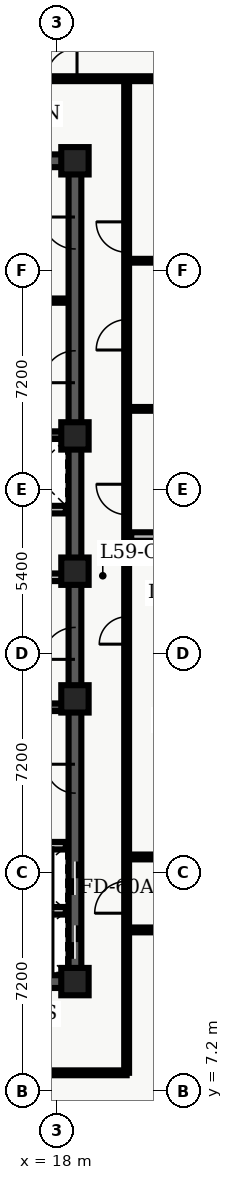
"""IFC4 building model, lengths in metres.
Left out: names, types, materials, properties, quantities, classifications, styles, units other than length and angle.
Written with IfcOpenShell. Run it as: python <this file> out.ifc"""

import sys

from ifc_helpers import new_model, entity, si_unit, converted_unit, direction, frame, origin_with_axes, origin_2d_with_axis, place, context, subcontext, project, spatial, polyline, rectangle, outline, extrude, element, fill, save


model = new_model("IFC4")
c1 = context("Model", 3, precision=1e-05, world=origin_with_axes(), true_north=direction((0.0, 1.0)))
c2 = subcontext(c1, "Body", "Model", "MODEL_VIEW")
j1 = project(units=[si_unit("LENGTHUNIT", "METRE"), converted_unit("PLANEANGLEUNIT", "DEGREE", entity("IfcPlaneAngleMeasure", 0.017), si_unit("PLANEANGLEUNIT", "RADIAN"), dimensions=[0, 0, 0, 0, 0, 0, 0])], contexts=[c1])
p1 = place(None, origin_with_axes())
s1 = spatial("IfcSite", under=j1, at=p1, CompositionType="ELEMENT")
p2 = place(p1, origin_with_axes())
s2 = spatial("IfcBuilding", under=s1, at=p2, CompositionType="ELEMENT")
p3 = place(p2, frame((0.0, 0.0, 240.3), z_axis=(0.0, 0.0, 1.0), x_axis=(1.0, 0.0, 0.0)))
s3 = spatial("IfcBuildingStorey", under=s2, at=p3, CompositionType="ELEMENT", Elevation=240.3)
p4 = place(p3, frame((11.4, 10.8, 0.0), z_axis=(0.0, 0.0, 1.0), x_axis=(1.0, 0.0, 0.0)))
e1 = element("IfcWall", 1, at=p4, inside=s3, PredefinedType="SHEAR", context=c2, shape_type="SweptSolid", body=[
    extrude(outline(polyline([(0.0, -0.21), (7.2, -0.21), (7.2, 0.21), (0.0, 0.21), (0.0, -0.21)])), origin_with_axes(), (0.0, 0.0, 1.0), 3.66),
])
p5 = place(p4, frame((2.625, 0.0, 0.0), z_axis=(0.0, 0.0, 1.0), x_axis=(1.0, 0.0, 0.0)))
e2 = element("IfcOpeningElement", 2, at=p5, cuts=e1, PredefinedType="OPENING", context=c2, shape_type="SweptSolid", body=[
    extrude(rectangle(XDim=1.05, YDim=0.44, at=origin_2d_with_axis()), origin_with_axes(), (0.0, 0.0, 1.0), 2.15),
])
p6 = place(p3, frame((11.4, 37.8, 0.0), z_axis=(0.0, 0.0, 1.0), x_axis=(1.0, 0.0, 0.0)))
e3 = element("IfcWall", 3, at=p6, inside=s3, PredefinedType="SHEAR", context=c2, shape_type="SweptSolid", body=[
    extrude(outline(polyline([(0.0, -0.21), (7.2, -0.21), (7.2, 0.21), (0.0, 0.21), (0.0, -0.21)])), origin_with_axes(), (0.0, 0.0, 1.0), 3.66),
])
p7 = place(p6, frame((2.625, 0.0, 0.0), z_axis=(0.0, 0.0, 1.0), x_axis=(1.0, 0.0, 0.0)))
e4 = element("IfcOpeningElement", 4, at=p7, cuts=e3, PredefinedType="OPENING", context=c2, shape_type="SweptSolid", body=[
    extrude(rectangle(XDim=1.05, YDim=0.44, at=origin_2d_with_axis()), origin_with_axes(), (0.0, 0.0, 1.0), 2.15),
])
p8 = place(p3, frame((18.6, 10.8, 0.0), z_axis=(0.0, 0.0, 1.0), x_axis=(0.0, 1.0, 0.0)))
e5 = element("IfcWall", 5, at=p8, inside=s3, PredefinedType="SHEAR", context=c2, shape_type="SweptSolid", body=[
    extrude(outline(polyline([(0.0, -0.21), (13.5, -0.21), (13.5, 0.21), (0.0, 0.21), (0.0, -0.21)])), origin_with_axes(), (0.0, 0.0, 1.0), 3.66),
])
p9 = place(p8, frame((1.3, 0.0, 0.0), z_axis=(0.0, 0.0, 1.0), x_axis=(1.0, 0.0, 0.0)))
e6 = element("IfcOpeningElement", 6, at=p9, cuts=e5, PredefinedType="OPENING", context=c2, shape_type="SweptSolid", body=[
    extrude(rectangle(XDim=1.1, YDim=0.44, at=origin_2d_with_axis()), origin_with_axes(), (0.0, 0.0, 1.0), 2.15),
])
p10 = place(p8, frame((3.4, 0.0, 0.0), z_axis=(0.0, 0.0, 1.0), x_axis=(1.0, 0.0, 0.0)))
e7 = element("IfcOpeningElement", 7, at=p10, cuts=e5, PredefinedType="OPENING", context=c2, shape_type="SweptSolid", body=[
    extrude(rectangle(XDim=1.1, YDim=0.44, at=origin_2d_with_axis()), origin_with_axes(), (0.0, 0.0, 1.0), 2.15),
])
p11 = place(p8, frame((11.125, 0.0, 0.0), z_axis=(0.0, 0.0, 1.0), x_axis=(1.0, 0.0, 0.0)))
e8 = element("IfcOpeningElement", 8, at=p11, cuts=e5, PredefinedType="OPENING", context=c2, shape_type="SweptSolid", body=[
    extrude(rectangle(XDim=1.05, YDim=0.44, at=origin_2d_with_axis()), origin_with_axes(), (0.0, 0.0, 1.0), 2.15),
])
p12 = place(p8, frame((6.675, 0.0, 0.0), z_axis=(0.0, 0.0, 1.0), x_axis=(1.0, 0.0, 0.0)))
e9 = element("IfcOpeningElement", 9, at=p12, cuts=e5, PredefinedType="OPENING", context=c2, shape_type="SweptSolid", body=[
    extrude(rectangle(XDim=0.95, YDim=0.44, at=origin_2d_with_axis()), origin_with_axes(), (0.0, 0.0, 1.0), 2.15),
])
p13 = place(p3, frame((18.6, 24.3, 0.0), z_axis=(0.0, 0.0, 1.0), x_axis=(0.0, 1.0, 0.0)))
e10 = element("IfcWall", 10, at=p13, inside=s3, PredefinedType="SHEAR", context=c2, shape_type="SweptSolid", body=[
    extrude(outline(polyline([(0.0, -0.21), (13.5, -0.21), (13.5, 0.21), (0.0, 0.21), (0.0, -0.21)])), origin_with_axes(), (0.0, 0.0, 1.0), 3.66),
])
p14 = place(p13, frame((6.725, 0.0, 0.0), z_axis=(0.0, 0.0, 1.0), x_axis=(1.0, 0.0, 0.0)))
e11 = element("IfcOpeningElement", 11, at=p14, cuts=e10, PredefinedType="OPENING", context=c2, shape_type="SweptSolid", body=[
    extrude(rectangle(XDim=1.05, YDim=0.44, at=origin_2d_with_axis()), origin_with_axes(), (0.0, 0.0, 1.0), 2.15),
])
p15 = place(p13, frame((11.125, 0.0, 0.0), z_axis=(0.0, 0.0, 1.0), x_axis=(1.0, 0.0, 0.0)))
e12 = element("IfcOpeningElement", 12, at=p15, cuts=e10, PredefinedType="OPENING", context=c2, shape_type="SweptSolid", body=[
    extrude(rectangle(XDim=1.05, YDim=0.44, at=origin_2d_with_axis()), origin_with_axes(), (0.0, 0.0, 1.0), 2.15),
])
for number, where, z_axis, x_axis in (
    (13, (11.61, 19.825, 0.0), (0.0, 0.0, 1.0), (1.0, 0.0, 0.0)),
    (14, (11.61, 28.775, 0.0), (0.0, 0.0, 1.0), (1.0, 0.0, 0.0)),
):
    element("IfcWall", number, at=place(p3, frame(where, z_axis=z_axis, x_axis=x_axis)), inside=s3, PredefinedType="SHEAR", context=c2, shape_type="SweptSolid", body=[
        extrude(outline(polyline([(0.0, -0.125), (6.78, -0.125), (6.78, 0.125), (0.0, 0.125), (0.0, -0.125)])), origin_with_axes(), (0.0, 0.0, 1.0), 3.66),
    ])
p16 = place(p3, frame((11.7, 24.1, 0.0), z_axis=(0.0, 0.0, 1.0), x_axis=(1.0, 0.0, 0.0)))
e15 = element("IfcWall", 15, at=p16, inside=s3, PredefinedType="SOLIDWALL", context=c2, shape_type="SweptSolid", body=[
    extrude(outline(polyline([(0.0, -0.125), (6.6, -0.125), (6.6, 0.125), (0.0, 0.125), (0.0, -0.125)])), origin_with_axes(), (0.0, 0.0, 1.0), 2.7),
])
p17 = place(p16, frame((3.6, 0.0, 0.0), z_axis=(0.0, 0.0, 1.0), x_axis=(1.0, 0.0, 0.0)))
e16 = element("IfcOpeningElement", 16, at=p17, cuts=e15, PredefinedType="OPENING", context=c2, shape_type="SweptSolid", body=[
    extrude(rectangle(XDim=0.9, YDim=0.27, at=origin_2d_with_axis()), origin_with_axes(), (0.0, 0.0, 1.0), 2.15),
])
p18 = place(p16, frame((5.65, 0.0, 0.0), z_axis=(0.0, 0.0, 1.0), x_axis=(1.0, 0.0, 0.0)))
e17 = element("IfcOpeningElement", 17, at=p18, cuts=e15, PredefinedType="OPENING", context=c2, shape_type="SweptSolid", body=[
    extrude(rectangle(XDim=0.9, YDim=0.27, at=origin_2d_with_axis()), origin_with_axes(), (0.0, 0.0, 1.0), 2.15),
])
p19 = place(p3, frame((11.7, 26.325, 0.0), z_axis=(0.0, 0.0, 1.0), x_axis=(1.0, 0.0, 0.0)))
e18 = element("IfcWall", 18, at=p19, inside=s3, PredefinedType="SOLIDWALL", context=c2, shape_type="SweptSolid", body=[
    extrude(outline(polyline([(0.0, -0.125), (6.6, -0.125), (6.6, 0.125), (0.0, 0.125), (0.0, -0.125)])), origin_with_axes(), (0.0, 0.0, 1.0), 2.7),
])
p20 = place(p19, frame((3.5, 0.0, 0.0), z_axis=(0.0, 0.0, 1.0), x_axis=(1.0, 0.0, 0.0)))
e19 = element("IfcOpeningElement", 19, at=p20, cuts=e18, PredefinedType="OPENING", context=c2, shape_type="SweptSolid", body=[
    extrude(rectangle(XDim=0.9, YDim=0.27, at=origin_2d_with_axis()), origin_with_axes(), (0.0, 0.0, 1.0), 2.15),
])
for number, where, z_axis, x_axis in (
    (20, (18.6, 10.8, 0.0), (0.0, 0.0, 1.0), (1.0, 0.0, 0.0)),
    (21, (18.6, 20.1, 0.0), (0.0, 0.0, 1.0), (1.0, 0.0, 0.0)),
    (22, (18.6, 24.3, 0.0), (0.0, 0.0, 1.0), (1.0, 0.0, 0.0)),
    (23, (18.6, 28.75, 0.0), (0.0, 0.0, 1.0), (1.0, 0.0, 0.0)),
    (24, (18.6, 37.8, 0.0), (0.0, 0.0, 1.0), (1.0, 0.0, 0.0)),
):
    element("IfcColumn", number, at=place(p3, frame(where, z_axis=z_axis, x_axis=x_axis)), inside=s3, PredefinedType="COLUMN", context=c2, shape_type="SweptSolid", body=[
        extrude(rectangle(XDim=0.9, YDim=0.9, at=origin_2d_with_axis()), origin_with_axes(), (0.0, 0.0, 1.0), 3.9),
    ])
for number, where, z_axis, x_axis in (
    (25, (15.84, 13.13, 0.0), (0.0, 0.0, 1.0), (1.0, 0.0, 0.0)),
    (26, (15.84, 15.27, 0.0), (0.0, 0.0, 1.0), (1.0, 0.0, 0.0)),
):
    element("IfcWall", number, at=place(p3, frame(where, z_axis=z_axis, x_axis=x_axis)), inside=s3, PredefinedType="SOLIDWALL", context=c2, shape_type="SweptSolid", body=[
        extrude(outline(polyline([(0.0, -0.125), (2.46, -0.125), (2.46, 0.125), (0.0, 0.125), (0.0, -0.125)])), origin_with_axes(), (0.0, 0.0, 1.0), 2.7),
    ])
p21 = place(p3, frame((15.84, 33.2, 0.0), z_axis=(0.0, 0.0, 1.0), x_axis=(1.0, 0.0, 0.0)))
e27 = element("IfcWall", 27, at=p21, inside=s3, PredefinedType="PARTITIONING", context=c2, shape_type="SweptSolid", body=[
    extrude(outline(polyline([(0.0, -0.07), (2.46, -0.07), (2.46, 0.07), (0.0, 0.07), (0.0, -0.07)])), origin_with_axes(), (0.0, 0.0, 1.0), 2.7),
])
p22 = place(p3, frame((7.1, 7.8, 0.0), z_axis=(0.0, 0.0, 1.0), x_axis=(1.0, 0.0, 0.0)))
e28 = element("IfcWall", 28, at=p22, inside=s3, PredefinedType="PARTITIONING", context=c2, shape_type="SweptSolid", body=[
    extrude(outline(polyline([(0.0, -0.08), (13.2, -0.08), (13.2, 0.08), (0.0, 0.08), (0.0, -0.08)])), origin_with_axes(), (0.0, 0.0, 1.0), 2.7),
])
p23 = place(p22, frame((6.57, 0.0, 0.0), z_axis=(0.0, 0.0, 1.0), x_axis=(1.0, 0.0, 0.0)))
e29 = element("IfcOpeningElement", 29, at=p23, cuts=e28, PredefinedType="OPENING", context=c2, shape_type="SweptSolid", body=[
    extrude(rectangle(XDim=1.2, YDim=0.18, at=origin_2d_with_axis()), origin_with_axes(), (0.0, 0.0, 1.0), 2.2),
])
p24 = place(p3, frame((7.1, 40.5, 0.0), z_axis=(0.0, 0.0, 1.0), x_axis=(1.0, 0.0, 0.0)))
e30 = element("IfcWall", 30, at=p24, inside=s3, PredefinedType="PARTITIONING", context=c2, shape_type="SweptSolid", body=[
    extrude(outline(polyline([(0.0, -0.08), (24.965, -0.08), (24.965, 0.08), (0.0, 0.08), (0.0, -0.08)])), origin_with_axes(), (0.0, 0.0, 1.0), 2.7),
])
p25 = place(p24, frame((3.395, 0.0, 0.0), z_axis=(0.0, 0.0, 1.0), x_axis=(1.0, 0.0, 0.0)))
e31 = element("IfcOpeningElement", 31, at=p25, cuts=e30, PredefinedType="OPENING", context=c2, shape_type="SweptSolid", body=[
    extrude(rectangle(XDim=1.0, YDim=0.18, at=origin_2d_with_axis()), origin_with_axes(), (0.0, 0.0, 1.0), 2.15),
])
p26 = place(p24, frame((5.418, 0.0, 0.0), z_axis=(0.0, 0.0, 1.0), x_axis=(1.0, 0.0, 0.0)))
e32 = element("IfcOpeningElement", 32, at=p26, cuts=e30, PredefinedType="OPENING", context=c2, shape_type="SweptSolid", body=[
    extrude(rectangle(XDim=1.0, YDim=0.18, at=origin_2d_with_axis()), origin_with_axes(), (0.0, 0.0, 1.0), 2.15),
])
p27 = place(p24, frame((8.386, 0.0, 0.0), z_axis=(0.0, 0.0, 1.0), x_axis=(1.0, 0.0, 0.0)))
e33 = element("IfcOpeningElement", 33, at=p27, cuts=e30, PredefinedType="OPENING", context=c2, shape_type="SweptSolid", body=[
    extrude(rectangle(XDim=1.0, YDim=0.18, at=origin_2d_with_axis()), origin_with_axes(), (0.0, 0.0, 1.0), 2.15),
])
p28 = place(p24, frame((11.068, 0.0, 0.0), z_axis=(0.0, 0.0, 1.0), x_axis=(1.0, 0.0, 0.0)))
e34 = element("IfcOpeningElement", 34, at=p28, cuts=e30, PredefinedType="OPENING", context=c2, shape_type="SweptSolid", body=[
    extrude(rectangle(XDim=1.0, YDim=0.18, at=origin_2d_with_axis()), origin_with_axes(), (0.0, 0.0, 1.0), 2.15),
])
p29 = place(p3, frame((20.3, 7.8, 0.0), z_axis=(0.0, 0.0, 1.0), x_axis=(0.0, 1.0, 0.0)))
e35 = element("IfcWall", 35, at=p29, inside=s3, PredefinedType="PARTITIONING", context=c2, shape_type="SweptSolid", body=[
    extrude(outline(polyline([(0.0, -0.08), (32.7, -0.08), (32.7, 0.08), (0.0, 0.08), (0.0, -0.08)])), origin_with_axes(), (0.0, 0.0, 1.0), 2.7),
])
p30 = place(p29, frame((14.55, 0.0, 0.0), z_axis=(0.0, 0.0, 1.0), x_axis=(1.0, 0.0, 0.0)))
e36 = element("IfcOpeningElement", 36, at=p30, cuts=e35, PredefinedType="OPENING", context=c2, shape_type="SweptSolid", body=[
    extrude(rectangle(XDim=0.9, YDim=0.18, at=origin_2d_with_axis()), origin_with_axes(), (0.0, 0.0, 1.0), 2.15),
])
p31 = place(p29, frame((18.86, 0.0, 0.0), z_axis=(0.0, 0.0, 1.0), x_axis=(1.0, 0.0, 0.0)))
e37 = element("IfcOpeningElement", 37, at=p31, cuts=e35, PredefinedType="OPENING", context=c2, shape_type="SweptSolid", body=[
    extrude(rectangle(XDim=1.0, YDim=0.18, at=origin_2d_with_axis()), origin_with_axes(), (0.0, 0.0, 1.0), 2.15),
])
p32 = place(p29, frame((24.276, 0.0, 0.0), z_axis=(0.0, 0.0, 1.0), x_axis=(1.0, 0.0, 0.0)))
e38 = element("IfcOpeningElement", 38, at=p32, cuts=e35, PredefinedType="OPENING", context=c2, shape_type="SweptSolid", body=[
    extrude(rectangle(XDim=1.0, YDim=0.18, at=origin_2d_with_axis()), origin_with_axes(), (0.0, 0.0, 1.0), 2.15),
])
p33 = place(p29, frame((27.491, 0.0, 0.0), z_axis=(0.0, 0.0, 1.0), x_axis=(1.0, 0.0, 0.0)))
e39 = element("IfcOpeningElement", 39, at=p33, cuts=e35, PredefinedType="OPENING", context=c2, shape_type="SweptSolid", body=[
    extrude(rectangle(XDim=1.0, YDim=0.18, at=origin_2d_with_axis()), origin_with_axes(), (0.0, 0.0, 1.0), 2.15),
])
p34 = place(p29, frame((5.775, 0.0, 0.0), z_axis=(0.0, 0.0, 1.0), x_axis=(1.0, 0.0, 0.0)))
e40 = element("IfcOpeningElement", 40, at=p34, cuts=e35, PredefinedType="OPENING", context=c2, shape_type="SweptSolid", body=[
    extrude(rectangle(XDim=1.05, YDim=0.18, at=origin_2d_with_axis()), origin_with_axes(), (0.0, 0.0, 1.0), 2.15),
])
p35 = place(p3, frame((20.45, 25.44, 0.0), z_axis=(0.0, 0.0, 1.0), x_axis=(1.0, 0.0, 0.0)))
e41 = element("IfcWall", 41, at=p35, inside=s3, PredefinedType="PARTITIONING", context=c2, shape_type="SweptSolid", body=[
    extrude(outline(polyline([(0.0, -0.14), (11.615, -0.14), (11.615, 0.14), (0.0, 0.14), (0.0, -0.14)])), origin_with_axes(), (0.0, 0.0, 1.0), 2.7),
])
for number, where, z_axis, x_axis in (
    (42, (20.45, 29.639, 0.0), (0.0, 0.0, 1.0), (1.0, 0.0, 0.0)),
    (43, (20.45, 34.512, 0.0), (0.0, 0.0, 1.0), (1.0, 0.0, 0.0)),
):
    element("IfcWall", number, at=place(p3, frame(where, z_axis=z_axis, x_axis=x_axis)), inside=s3, PredefinedType="PARTITIONING", context=c2, shape_type="SweptSolid", body=[
        extrude(outline(polyline([(0.0, -0.062), (11.615, -0.062), (11.615, 0.062), (0.0, 0.062), (0.0, -0.062)])), origin_with_axes(), (0.0, 0.0, 1.0), 2.7),
    ])
p36 = place(p3, frame((20.3, 12.5, 0.0), z_axis=(0.0, 0.0, 1.0), x_axis=(1.0, 0.0, 0.0)))
e44 = element("IfcWall", 44, at=p36, inside=s3, PredefinedType="PARTITIONING", context=c2, shape_type="SweptSolid", body=[
    extrude(outline(polyline([(0.0, -0.08), (16.05, -0.08), (16.05, 0.08), (0.0, 0.08), (0.0, -0.08)])), origin_with_axes(), (0.0, 0.0, 1.0), 2.7),
])
p37 = place(p36, frame((8.075, 0.0, 0.0), z_axis=(0.0, 0.0, 1.0), x_axis=(1.0, 0.0, 0.0)))
e45 = element("IfcOpeningElement", 45, at=p37, cuts=e44, PredefinedType="OPENING", context=c2, shape_type="SweptSolid", body=[
    extrude(rectangle(XDim=1.0, YDim=0.18, at=origin_2d_with_axis()), origin_with_axes(), (0.0, 0.0, 1.0), 2.15),
])
p38 = place(p3, frame((20.3, 14.9, 0.0), z_axis=(0.0, 0.0, 1.0), x_axis=(1.0, 0.0, 0.0)))
e46 = element("IfcWall", 46, at=p38, inside=s3, PredefinedType="PARTITIONING", context=c2, shape_type="SweptSolid", body=[
    extrude(outline(polyline([(0.0, -0.08), (16.05, -0.08), (16.05, 0.08), (0.0, 0.08), (0.0, -0.08)])), origin_with_axes(), (0.0, 0.0, 1.0), 2.7),
])
p39 = place(p38, frame((2.358, 0.0, 0.0), z_axis=(0.0, 0.0, 1.0), x_axis=(1.0, 0.0, 0.0)))
e47 = element("IfcOpeningElement", 47, at=p39, cuts=e46, PredefinedType="OPENING", context=c2, shape_type="SweptSolid", body=[
    extrude(rectangle(XDim=1.0, YDim=0.18, at=origin_2d_with_axis()), origin_with_axes(), (0.0, 0.0, 1.0), 2.15),
])
p40 = place(p38, frame((5.918, 0.0, 0.0), z_axis=(0.0, 0.0, 1.0), x_axis=(1.0, 0.0, 0.0)))
e48 = element("IfcOpeningElement", 48, at=p40, cuts=e46, PredefinedType="OPENING", context=c2, shape_type="SweptSolid", body=[
    extrude(rectangle(XDim=1.0, YDim=0.18, at=origin_2d_with_axis()), origin_with_axes(), (0.0, 0.0, 1.0), 2.15),
])
p41 = place(p38, frame((9.89, 0.0, 0.0), z_axis=(0.0, 0.0, 1.0), x_axis=(1.0, 0.0, 0.0)))
e49 = element("IfcOpeningElement", 49, at=p41, cuts=e46, PredefinedType="OPENING", context=c2, shape_type="SweptSolid", body=[
    extrude(rectangle(XDim=1.2, YDim=0.18, at=origin_2d_with_axis()), origin_with_axes(), (0.0, 0.0, 1.0), 2.2),
])
p42 = place(p38, frame((14.225, 0.0, 0.0), z_axis=(0.0, 0.0, 1.0), x_axis=(1.0, 0.0, 0.0)))
e50 = element("IfcOpeningElement", 50, at=p42, cuts=e46, PredefinedType="OPENING", context=c2, shape_type="SweptSolid", body=[
    extrude(rectangle(XDim=1.0, YDim=0.18, at=origin_2d_with_axis()), origin_with_axes(), (0.0, 0.0, 1.0), 2.15),
])
p43 = place(p8, frame((1.3, 0.0, 0.0), z_axis=(0.0, 0.0, 1.0), x_axis=(1.0, 0.0, 0.0)))
e51 = element("IfcDoor", 51, at=p43, inside=s3, OperationType="SLIDING_TO_LEFT", PredefinedType="DOOR", context=c2, shape_type="SweptSolid", body=[
    extrude(rectangle(XDim=1.1, YDim=0.09, at=origin_2d_with_axis()), origin_with_axes(), (0.0, 0.0, 1.0), 2.15),
])
fill(e6, e51)
p44 = place(p8, frame((3.4, 0.0, 0.0), z_axis=(0.0, 0.0, 1.0), x_axis=(1.0, 0.0, 0.0)))
e52 = element("IfcDoor", 52, at=p44, inside=s3, OperationType="SLIDING_TO_RIGHT", PredefinedType="DOOR", context=c2, shape_type="SweptSolid", body=[
    extrude(rectangle(XDim=1.1, YDim=0.09, at=origin_2d_with_axis()), origin_with_axes(), (0.0, 0.0, 1.0), 2.15),
])
fill(e7, e52)
p45 = place(p8, frame((11.125, 0.0, 0.0), z_axis=(0.0, 0.0, 1.0), x_axis=(1.0, 0.0, 0.0)))
e53 = element("IfcDoor", 53, at=p45, inside=s3, OperationType="SINGLE_SWING_LEFT", PredefinedType="DOOR", context=c2, shape_type="SweptSolid", body=[
    extrude(rectangle(XDim=1.05, YDim=0.09, at=origin_2d_with_axis()), origin_with_axes(), (0.0, 0.0, 1.0), 2.15),
])
fill(e8, e53)
p46 = place(p8, frame((6.675, 0.0, 0.0), z_axis=(0.0, 0.0, 1.0), x_axis=(1.0, 0.0, 0.0)))
e54 = element("IfcDoor", 54, at=p46, inside=s3, OperationType="SINGLE_SWING_RIGHT", PredefinedType="DOOR", context=c2, shape_type="SweptSolid", body=[
    extrude(rectangle(XDim=0.95, YDim=0.09, at=origin_2d_with_axis()), origin_with_axes(), (0.0, 0.0, 1.0), 2.15),
])
fill(e9, e54)
p47 = place(p13, frame((6.725, 0.0, 0.0), z_axis=(0.0, 0.0, 1.0), x_axis=(1.0, 0.0, 0.0)))
e55 = element("IfcDoor", 55, at=p47, inside=s3, OperationType="SINGLE_SWING_LEFT", PredefinedType="DOOR", context=c2, shape_type="SweptSolid", body=[
    extrude(rectangle(XDim=1.05, YDim=0.09, at=origin_2d_with_axis()), origin_with_axes(), (0.0, 0.0, 1.0), 2.15),
])
fill(e11, e55)
p48 = place(p13, frame((11.125, 0.0, 0.0), z_axis=(0.0, 0.0, 1.0), x_axis=(1.0, 0.0, 0.0)))
e56 = element("IfcDoor", 56, at=p48, inside=s3, OperationType="SINGLE_SWING_RIGHT", PredefinedType="DOOR", context=c2, shape_type="SweptSolid", body=[
    extrude(rectangle(XDim=1.05, YDim=0.09, at=origin_2d_with_axis()), origin_with_axes(), (0.0, 0.0, 1.0), 2.15),
])
fill(e12, e56)
p49 = place(p24, frame((11.068, 0.0, 0.0), z_axis=(0.0, 0.0, 1.0), x_axis=(1.0, 0.0, 0.0)))
e57 = element("IfcDoor", 57, at=p49, inside=s3, OperationType="SINGLE_SWING_RIGHT", PredefinedType="DOOR", context=c2, shape_type="SweptSolid", body=[
    extrude(rectangle(XDim=1.0, YDim=0.09, at=origin_2d_with_axis()), origin_with_axes(), (0.0, 0.0, 1.0), 2.15),
])
fill(e34, e57)
p50 = place(p29, frame((14.55, 0.0, 0.0), z_axis=(0.0, 0.0, 1.0), x_axis=(1.0, 0.0, 0.0)))
e58 = element("IfcDoor", 58, at=p50, inside=s3, OperationType="SINGLE_SWING_LEFT", PredefinedType="DOOR", context=c2, shape_type="SweptSolid", body=[
    extrude(rectangle(XDim=0.9, YDim=0.09, at=origin_2d_with_axis()), origin_with_axes(), (0.0, 0.0, 1.0), 2.15),
])
fill(e36, e58)
p51 = place(p29, frame((18.86, 0.0, 0.0), z_axis=(0.0, 0.0, 1.0), x_axis=(1.0, 0.0, 0.0)))
e59 = element("IfcDoor", 59, at=p51, inside=s3, OperationType="SINGLE_SWING_RIGHT", PredefinedType="DOOR", context=c2, shape_type="SweptSolid", body=[
    extrude(rectangle(XDim=1.0, YDim=0.09, at=origin_2d_with_axis()), origin_with_axes(), (0.0, 0.0, 1.0), 2.15),
])
fill(e37, e59)
p52 = place(p29, frame((24.276, 0.0, 0.0), z_axis=(0.0, 0.0, 1.0), x_axis=(1.0, 0.0, 0.0)))
e60 = element("IfcDoor", 60, at=p52, inside=s3, OperationType="SINGLE_SWING_LEFT", PredefinedType="DOOR", context=c2, shape_type="SweptSolid", body=[
    extrude(rectangle(XDim=1.0, YDim=0.09, at=origin_2d_with_axis()), origin_with_axes(), (0.0, 0.0, 1.0), 2.15),
])
fill(e38, e60)
p53 = place(p29, frame((27.491, 0.0, 0.0), z_axis=(0.0, 0.0, 1.0), x_axis=(1.0, 0.0, 0.0)))
e61 = element("IfcDoor", 61, at=p53, inside=s3, OperationType="SINGLE_SWING_RIGHT", PredefinedType="DOOR", context=c2, shape_type="SweptSolid", body=[
    extrude(rectangle(XDim=1.0, YDim=0.09, at=origin_2d_with_axis()), origin_with_axes(), (0.0, 0.0, 1.0), 2.15),
])
fill(e39, e61)
p54 = place(p29, frame((5.775, 0.0, 0.0), z_axis=(0.0, 0.0, 1.0), x_axis=(1.0, 0.0, 0.0)))
e62 = element("IfcDoor", 62, at=p54, inside=s3, OperationType="SINGLE_SWING_LEFT", PredefinedType="DOOR", context=c2, shape_type="SweptSolid", body=[
    extrude(rectangle(XDim=1.05, YDim=0.09, at=origin_2d_with_axis()), origin_with_axes(), (0.0, 0.0, 1.0), 2.15),
])
fill(e40, e62)
save(model, sys.argv[1])
